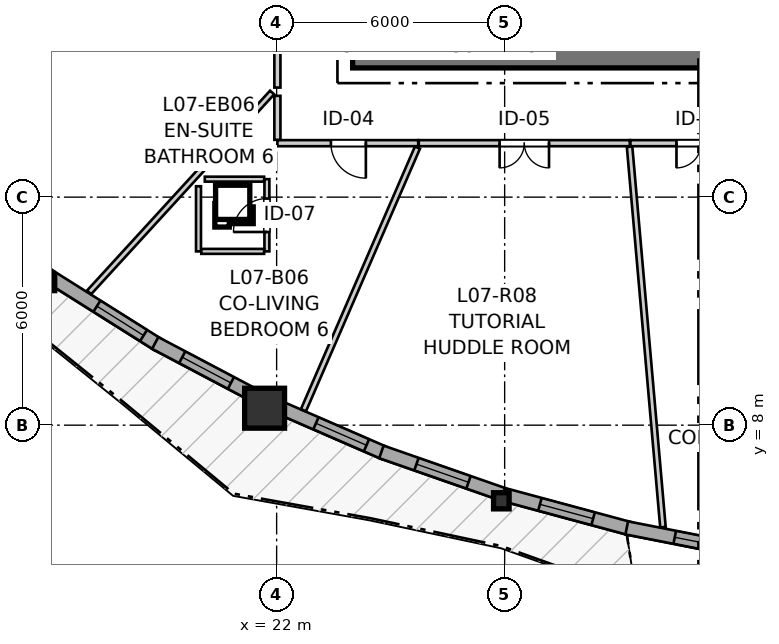
"""IFC4 building model, lengths in metres.
Left out: names, types, materials, properties, quantities, classifications, styles, units other than length and angle.
Written with IfcOpenShell. Run it as: python <this file> out.ifc"""

import sys

from ifc_helpers import new_model, si_unit, direction, frame, frame_2d, origin, origin_2d, place, context, subcontext, project, spatial, rectangle, i_section, extrude, source, transform, mapped, element, fill, save


model = new_model("IFC4")
c1 = context("Model", 3, precision=1e-05, world=origin(), true_north=direction((0.0, 1.0)))
c2 = subcontext(c1, "Body", "Model", "MODEL_VIEW")
j1 = project(units=[si_unit("LENGTHUNIT", "METRE"), si_unit("PLANEANGLEUNIT", "RADIAN")], contexts=[c1])
p1 = place(None, origin())
s1 = spatial("IfcSite", under=j1, at=p1, CompositionType="ELEMENT")
p2 = place(p1, origin())
s2 = spatial("IfcBuilding", under=s1, at=p2, CompositionType="ELEMENT")
p3 = place(p2, frame((0.0, 0.0, 27.0)))
s3 = spatial("IfcBuildingStorey", under=s2, at=p3, CompositionType="ELEMENT", Elevation=27.0)
p4 = place(p3, frame((24.0, 17.8, 0.0), z_axis=(0.0, 0.0, 1.0), x_axis=(1.0, 0.0, 0.0)))
e1 = element("IfcWall", 1, at=p4, inside=s3, PredefinedType="SHEAR", context=c2, shape_type="SweptSolid", body=[
    extrude(rectangle(XDim=12.7, YDim=0.8, at=frame_2d((6.35, 0.0))), origin(), (0.0, 0.0, 1.0), 2.935),
])
m1 = source(origin(), c2, "Body", "SweptSolid", [
    extrude(i_section(OverallWidth=0.409, OverallDepth=0.425, WebThickness=0.03, FlangeThickness=0.048, FilletRadius=0.015, at=origin_2d()), origin(), (0.0, 0.0, 1.0), 2.935),
])
p5 = place(p3, frame((15.956, 11.753, 0.0), z_axis=(0.0, 0.0, 1.0), x_axis=(1.0, 0.0, 0.0)))
e2 = element("IfcColumn", 2, at=p5, inside=s3, PredefinedType="PILASTER", context=c2, shape_type="MappedRepresentation", body=[
    mapped(m1, transform((0.0, 0.0, 0.0), x_axis=(1.0, 0.0, 0.0), y_axis=(0.0, 1.0, 0.0), z_axis=(0.0, 0.0, 1.0), scale=1.0)),
])
m2 = source(origin(), c2, "Body", "SweptSolid", [
    extrude(rectangle(XDim=1.05, YDim=1.05, at=origin_2d()), origin(), (0.0, 0.0, 1.0), 2.935),
])
p6 = place(p3, frame((21.683, 8.446, 0.0), z_axis=(0.0, 0.0, 1.0), x_axis=(1.0, 0.0, 0.0)))
e3 = element("IfcColumn", 3, at=p6, inside=s3, PredefinedType="COLUMN", context=c2, shape_type="MappedRepresentation", body=[
    mapped(m2, transform((0.0, 0.0, 0.0), x_axis=(1.0, 0.0, 0.0), y_axis=(0.0, 1.0, 0.0), z_axis=(0.0, 0.0, 1.0), scale=1.0)),
])
p7 = place(p3, frame((27.913, 6.01, 0.0), z_axis=(0.0, 0.0, 1.0), x_axis=(1.0, 0.0, 0.0)))
e4 = element("IfcColumn", 4, at=p7, inside=s3, PredefinedType="PILASTER", context=c2, shape_type="MappedRepresentation", body=[
    mapped(m1, transform((0.0, 0.0, 0.0), x_axis=(1.0, 0.0, 0.0), y_axis=(0.0, 1.0, 0.0), z_axis=(0.0, 0.0, 1.0), scale=1.0)),
])
p8 = place(p3, frame((13.355, 13.896, 0.0), z_axis=(0.0, 0.0, 1.0), x_axis=(0.803836316566, -0.594850549441, 0.0)))
e5 = element("IfcWall", 5, at=p8, inside=s3, PredefinedType="SOLIDWALL", context=c2, shape_type="SweptSolid", body=[
    extrude(rectangle(XDim=3.346, YDim=0.35, at=frame_2d((1.673, 0.0))), origin(), (0.0, 0.0, 1.0), 2.415),
])
p9 = place(p8, frame((1.108, 0.0, 0.82)))
e6 = element("IfcOpeningElement", 6, at=p9, cuts=e5, PredefinedType="OPENING", context=c2, shape_type="SweptSolid", body=[
    extrude(rectangle(XDim=1.15, YDim=1.2, at=frame_2d((0.575, 0.6))), frame((0.0, 0.185, 0.0), z_axis=(0.0, -1.0, 0.0), x_axis=(1.0, 0.0, 0.0)), (0.0, 0.0, 1.0), 0.37),
])
p10 = place(p3, frame((16.066, 11.89, 0.0), z_axis=(0.0, 0.0, 1.0), x_axis=(0.846403135518, -0.532542704565, 0.0)))
e7 = element("IfcWall", 7, at=p10, inside=s3, PredefinedType="SOLIDWALL", context=c2, shape_type="SweptSolid", body=[
    extrude(rectangle(XDim=3.327, YDim=0.35, at=frame_2d((1.664, 0.0))), origin(), (0.0, 0.0, 1.0), 2.415),
])
p11 = place(p10, frame((1.424, 0.0, 0.82)))
e8 = element("IfcOpeningElement", 8, at=p11, cuts=e7, PredefinedType="OPENING", context=c2, shape_type="SweptSolid", body=[
    extrude(rectangle(XDim=1.45, YDim=1.25, at=frame_2d((0.725, 0.625))), frame((0.0, 0.185, 0.0), z_axis=(0.0, -1.0, 0.0), x_axis=(1.0, 0.0, 0.0)), (0.0, 0.0, 1.0), 0.37),
])
p12 = place(p3, frame((18.805, 10.163, 0.0), z_axis=(0.0, 0.0, 1.0), x_axis=(0.884387509242, -0.466753396877, 0.0)))
e9 = element("IfcWall", 9, at=p12, inside=s3, PredefinedType="SOLIDWALL", context=c2, shape_type="SweptSolid", body=[
    extrude(rectangle(XDim=3.047, YDim=0.35, at=frame_2d((1.523, 0.0))), origin(), (0.0, 0.0, 1.0), 2.415),
])
p13 = place(p12, frame((0.803, 0.0, 0.82)))
e10 = element("IfcOpeningElement", 10, at=p13, cuts=e9, PredefinedType="OPENING", context=c2, shape_type="SweptSolid", body=[
    extrude(rectangle(XDim=1.45, YDim=1.25, at=frame_2d((0.725, 0.625))), frame((0.0, 0.185, 0.0), z_axis=(0.0, -1.0, 0.0), x_axis=(1.0, 0.0, 0.0)), (0.0, 0.0, 1.0), 0.37),
])
p14 = place(p3, frame((22.028, 8.487, 0.0), z_axis=(0.0, 0.0, 1.0), x_axis=(0.917081449464, -0.398699906006, 0.0)))
e11 = element("IfcWall", 11, at=p14, inside=s3, PredefinedType="SOLIDWALL", context=c2, shape_type="SweptSolid", body=[
    extrude(rectangle(XDim=3.066, YDim=0.35, at=frame_2d((1.533, 0.0))), origin(), (0.0, 0.0, 1.0), 2.415),
])
p15 = place(p14, frame((1.097, 0.0, 0.82)))
e12 = element("IfcOpeningElement", 12, at=p15, cuts=e11, PredefinedType="OPENING", context=c2, shape_type="SweptSolid", body=[
    extrude(rectangle(XDim=1.45, YDim=1.25, at=frame_2d((0.725, 0.625))), frame((0.0, 0.185, 0.0), z_axis=(0.0, -1.0, 0.0), x_axis=(1.0, 0.0, 0.0)), (0.0, 0.0, 1.0), 0.37),
])
p16 = place(p3, frame((24.757, 7.297, 0.0), z_axis=(0.0, 0.0, 1.0), x_axis=(0.944122401027, -0.329595042254, 0.0)))
e13 = element("IfcWall", 13, at=p16, inside=s3, PredefinedType="SOLIDWALL", context=c2, shape_type="SweptSolid", body=[
    extrude(rectangle(XDim=3.384, YDim=0.35, at=frame_2d((1.692, 0.0))), origin(), (0.0, 0.0, 1.0), 2.415),
])
p17 = place(p16, frame((0.977, 0.0, 0.82)))
e14 = element("IfcOpeningElement", 14, at=p17, cuts=e13, PredefinedType="OPENING", context=c2, shape_type="SweptSolid", body=[
    extrude(rectangle(XDim=1.45, YDim=1.25, at=frame_2d((0.725, 0.625))), frame((0.0, 0.185, 0.0), z_axis=(0.0, -1.0, 0.0), x_axis=(1.0, 0.0, 0.0)), (0.0, 0.0, 1.0), 0.37),
])
p18 = place(p3, frame((27.978, 6.174, 0.0), z_axis=(0.0, 0.0, 1.0), x_axis=(0.965451765427, -0.260581827136, 0.0)))
e15 = element("IfcWall", 15, at=p18, inside=s3, PredefinedType="SOLIDWALL", context=c2, shape_type="SweptSolid", body=[
    extrude(rectangle(XDim=3.439, YDim=0.35, at=frame_2d((1.72, 0.0))), origin(), (0.0, 0.0, 1.0), 2.415),
])
p19 = place(p18, frame((0.985, 0.0, 0.82)))
e16 = element("IfcOpeningElement", 16, at=p19, cuts=e15, PredefinedType="OPENING", context=c2, shape_type="SweptSolid", body=[
    extrude(rectangle(XDim=1.45, YDim=1.25, at=frame_2d((0.725, 0.625))), frame((0.0, 0.185, 0.0), z_axis=(0.0, -1.0, 0.0), x_axis=(1.0, 0.0, 0.0)), (0.0, 0.0, 1.0), 0.37),
])
p20 = place(p3, frame((31.213, 5.298, 0.0), z_axis=(0.0, 0.0, 1.0), x_axis=(0.9812345335, -0.192818023709, 0.0)))
e17 = element("IfcWall", 17, at=p20, inside=s3, PredefinedType="SOLIDWALL", context=c2, shape_type="SweptSolid", body=[
    extrude(rectangle(XDim=3.232, YDim=0.35, at=frame_2d((1.616, 0.0))), origin(), (0.0, 0.0, 1.0), 2.415),
])
p21 = place(p20, frame((1.287, 0.0, 0.82)))
e18 = element("IfcOpeningElement", 18, at=p21, cuts=e17, PredefinedType="OPENING", context=c2, shape_type="SweptSolid", body=[
    extrude(rectangle(XDim=1.45, YDim=1.25, at=frame_2d((0.725, 0.625))), frame((0.0, 0.185, 0.0), z_axis=(0.0, -1.0, 0.0), x_axis=(1.0, 0.0, 0.0)), (0.0, 0.0, 1.0), 0.37),
])
p22 = place(p3, frame((22.02, 16.883, 0.0), z_axis=(0.0, 0.0, 1.0), x_axis=(0.0, 1.0, 0.0)))
e19 = element("IfcWall", 19, at=p22, inside=s3, PredefinedType="PARTITIONING", context=c2, shape_type="SweptSolid", body=[
    extrude(rectangle(XDim=7.267, YDim=0.16, at=frame_2d((3.633, 0.0))), origin(), (0.0, 0.0, 1.0), 2.935),
])
p23 = place(p22, frame((2.845, 0.0, 0.0)))
e20 = element("IfcOpeningElement", 20, at=p23, cuts=e19, PredefinedType="OPENING", context=c2, shape_type="SweptSolid", body=[
    extrude(rectangle(XDim=1.3, YDim=2.1, at=frame_2d((0.65, 1.05))), frame((0.0, 0.09, 0.0), z_axis=(0.0, -1.0, 0.0), x_axis=(1.0, 0.0, 0.0)), (0.0, 0.0, 1.0), 0.18),
])
p24 = place(p3, frame((31.294, 15.42, 0.0), z_axis=(0.0, 0.0, 1.0), x_axis=(-1.0, 0.0, 0.0)))
e21 = element("IfcWall", 21, at=p24, inside=s3, PredefinedType="PARTITIONING", context=c2, shape_type="SweptSolid", body=[
    extrude(rectangle(XDim=5.554, YDim=0.16, at=frame_2d((2.777, 0.0))), origin(), (0.0, 0.0, 1.0), 2.935),
])
p25 = place(p24, frame((2.126, 0.0, 0.0)))
e22 = element("IfcOpeningElement", 22, at=p25, cuts=e21, PredefinedType="OPENING", context=c2, shape_type="SweptSolid", body=[
    extrude(rectangle(XDim=1.3, YDim=2.1, at=frame_2d((0.65, 1.05))), frame((0.0, 0.09, 0.0), z_axis=(0.0, -1.0, 0.0), x_axis=(1.0, 0.0, 0.0)), (0.0, 0.0, 1.0), 0.18),
])
p26 = place(p3, frame((35.08, 15.42, 0.0), z_axis=(0.0, 0.0, 1.0), x_axis=(-1.0, 0.0, 0.0)))
e23 = element("IfcWall", 23, at=p26, inside=s3, PredefinedType="PARTITIONING", context=c2, shape_type="SweptSolid", body=[
    extrude(rectangle(XDim=3.771, YDim=0.16, at=frame_2d((1.885, 0.0))), origin(), (0.0, 0.0, 1.0), 2.935),
])
p27 = place(p26, frame((1.259, 0.0, 0.0)))
e24 = element("IfcOpeningElement", 24, at=p27, cuts=e23, PredefinedType="OPENING", context=c2, shape_type="SweptSolid", body=[
    extrude(rectangle(XDim=1.3, YDim=2.1, at=frame_2d((0.65, 1.05))), frame((0.0, 0.09, 0.0), z_axis=(0.0, -1.0, 0.0), x_axis=(1.0, 0.0, 0.0)), (0.0, 0.0, 1.0), 0.18),
])
p28 = place(p3, frame((25.725, 15.42, 0.0), z_axis=(0.0, 0.0, 1.0), x_axis=(-1.0, 0.0, 0.0)))
e25 = element("IfcWall", 25, at=p28, inside=s3, PredefinedType="PARTITIONING", context=c2, shape_type="SweptSolid", body=[
    extrude(rectangle(XDim=3.705, YDim=0.16, at=frame_2d((1.853, 0.0))), origin(), (0.0, 0.0, 1.0), 2.935),
])
p29 = place(p28, frame((1.377, 0.0, 0.0)))
e26 = element("IfcOpeningElement", 26, at=p29, cuts=e25, PredefinedType="OPENING", context=c2, shape_type="SweptSolid", body=[
    extrude(rectangle(XDim=0.92, YDim=2.1, at=frame_2d((0.46, 1.05))), frame((0.0, 0.09, 0.0), z_axis=(0.0, -1.0, 0.0), x_axis=(1.0, 0.0, 0.0)), (0.0, 0.0, 1.0), 0.18),
])
p30 = place(p3, frame((21.744, 12.573, 0.0), z_axis=(0.0, 0.0, 1.0), x_axis=(0.0, 1.0, 0.0)))
e27 = element("IfcWall", 27, at=p30, inside=s3, PredefinedType="PARTITIONING", context=c2, shape_type="SweptSolid", body=[
    extrude(rectangle(XDim=1.9, YDim=0.13, at=frame_2d((0.95, 0.0))), origin(), (0.0, 0.0, 1.0), 2.935),
])
p31 = place(p30, frame((0.51, 0.0, 0.0)))
e28 = element("IfcOpeningElement", 28, at=p31, cuts=e27, PredefinedType="OPENING", context=c2, shape_type="SweptSolid", body=[
    extrude(rectangle(XDim=0.88, YDim=2.05, at=frame_2d((0.44, 1.025))), frame((0.0, 0.075, 0.0), z_axis=(0.0, -1.0, 0.0), x_axis=(1.0, 0.0, 0.0)), (0.0, 0.0, 1.0), 0.15),
])
p32 = place(p3, frame((31.287, 15.326, 0.0), z_axis=(0.0, 0.0, 1.0), x_axis=(0.087404477037, -0.99617290537, 0.0)))
e29 = element("IfcWall", 29, at=p32, inside=s3, PredefinedType="PARTITIONING", context=c2, shape_type="SweptSolid", body=[
    extrude(rectangle(XDim=10.047, YDim=0.145, at=frame_2d((5.023, 0.0))), origin(), (0.0, 0.0, 1.0), 2.935),
])
p33 = place(p3, frame((22.705, 8.392, 0.0), z_axis=(0.0, 0.0, 1.0), x_axis=(0.398228422372, 0.917286282256, 0.0)))
e30 = element("IfcWall", 30, at=p33, inside=s3, PredefinedType="PARTITIONING", context=c2, shape_type="SweptSolid", body=[
    extrude(rectangle(XDim=7.535, YDim=0.145, at=frame_2d((3.767, 0.0))), origin(), (0.0, 0.0, 1.0), 2.935),
])
p34 = place(p3, frame((17.064, 11.493, 0.0), z_axis=(0.0, 0.0, 1.0), x_axis=(0.67534166785, 0.737505004502, 0.0)))
e31 = element("IfcWall", 31, at=p34, inside=s3, PredefinedType="PARTITIONING", context=c2, shape_type="SweptSolid", body=[
    extrude(rectangle(XDim=7.132, YDim=0.145, at=frame_2d((3.566, 0.0))), origin(), (0.0, 0.0, 1.0), 2.935),
])
p35 = place(p3, frame((19.944, 12.573, 0.0), z_axis=(0.0, 0.0, 1.0), x_axis=(0.0, 1.0, 0.0)))
e32 = element("IfcWall", 32, at=p35, inside=s3, PredefinedType="PARTITIONING", context=c2, shape_type="SweptSolid", body=[
    extrude(rectangle(XDim=1.714, YDim=0.13, at=frame_2d((0.857, 0.0))), origin(), (0.0, 0.0, 1.0), 2.935),
])
p36 = place(p3, frame((20.11, 14.473, 0.0), z_axis=(0.0, 0.0, 1.0), x_axis=(1.0, 0.0, 0.0)))
e33 = element("IfcWall", 33, at=p36, inside=s3, PredefinedType="PARTITIONING", context=c2, shape_type="SweptSolid", body=[
    extrude(rectangle(XDim=1.561, YDim=0.13, at=frame_2d((0.781, 0.0))), origin(), (0.0, 0.0, 1.0), 2.935),
])
p37 = place(p3, frame((20.017, 12.573, 0.0), z_axis=(0.0, 0.0, 1.0), x_axis=(1.0, 0.0, 0.0)))
e34 = element("IfcWall", 34, at=p37, inside=s3, PredefinedType="PARTITIONING", context=c2, shape_type="SweptSolid", body=[
    extrude(rectangle(XDim=1.654, YDim=0.13, at=frame_2d((0.827, 0.0))), origin(), (0.0, 0.0, 1.0), 2.935),
])
p38 = place(p3, frame((22.02, 15.508, 0.0), z_axis=(0.0, 0.0, 1.0), x_axis=(0.0, 1.0, 0.0)))
e35 = element("IfcWall", 35, at=p38, inside=s3, PredefinedType="PARTITIONING", context=c2, shape_type="SweptSolid", body=[
    extrude(rectangle(XDim=1.157, YDim=0.16, at=frame_2d((0.579, 0.0))), origin(), (0.0, 0.0, 1.0), 2.935),
])
m3 = source(origin(), c2, "Body", "SweptSolid", [
    extrude(rectangle(XDim=1.45, YDim=1.25, at=frame_2d((0.725, 0.625))), frame((0.0, 0.03, 0.0), z_axis=(0.0, -1.0, 0.0), x_axis=(1.0, 0.0, 0.0)), (0.0, 0.0, 1.0), 0.06),
])
p39 = place(p11, origin())
e36 = element("IfcWindow", 36, at=p39, inside=s3, PartitioningType="SINGLE_PANEL", PredefinedType="WINDOW", context=c2, shape_type="MappedRepresentation", body=[
    mapped(m3, transform((0.0, 0.0, 0.0), x_axis=(1.0, 0.0, 0.0), y_axis=(0.0, 1.0, 0.0), z_axis=(0.0, 0.0, 1.0), scale=1.0)),
])
fill(e8, e36)
p40 = place(p13, origin())
e37 = element("IfcWindow", 37, at=p40, inside=s3, PartitioningType="SINGLE_PANEL", PredefinedType="WINDOW", context=c2, shape_type="MappedRepresentation", body=[
    mapped(m3, transform((0.0, 0.0, 0.0), x_axis=(1.0, 0.0, 0.0), y_axis=(0.0, 1.0, 0.0), z_axis=(0.0, 0.0, 1.0), scale=1.0)),
])
fill(e10, e37)
p41 = place(p15, origin())
e38 = element("IfcWindow", 38, at=p41, inside=s3, PartitioningType="SINGLE_PANEL", PredefinedType="WINDOW", context=c2, shape_type="MappedRepresentation", body=[
    mapped(m3, transform((0.0, 0.0, 0.0), x_axis=(1.0, 0.0, 0.0), y_axis=(0.0, 1.0, 0.0), z_axis=(0.0, 0.0, 1.0), scale=1.0)),
])
fill(e12, e38)
p42 = place(p17, origin())
e39 = element("IfcWindow", 39, at=p42, inside=s3, PartitioningType="SINGLE_PANEL", PredefinedType="WINDOW", context=c2, shape_type="MappedRepresentation", body=[
    mapped(m3, transform((0.0, 0.0, 0.0), x_axis=(1.0, 0.0, 0.0), y_axis=(0.0, 1.0, 0.0), z_axis=(0.0, 0.0, 1.0), scale=1.0)),
])
fill(e14, e39)
p43 = place(p19, origin())
e40 = element("IfcWindow", 40, at=p43, inside=s3, PartitioningType="SINGLE_PANEL", PredefinedType="WINDOW", context=c2, shape_type="MappedRepresentation", body=[
    mapped(m3, transform((0.0, 0.0, 0.0), x_axis=(1.0, 0.0, 0.0), y_axis=(0.0, 1.0, 0.0), z_axis=(0.0, 0.0, 1.0), scale=1.0)),
])
fill(e16, e40)
p44 = place(p21, origin())
e41 = element("IfcWindow", 41, at=p44, inside=s3, PartitioningType="SINGLE_PANEL", PredefinedType="WINDOW", context=c2, shape_type="MappedRepresentation", body=[
    mapped(m3, transform((0.0, 0.0, 0.0), x_axis=(1.0, 0.0, 0.0), y_axis=(0.0, 1.0, 0.0), z_axis=(0.0, 0.0, 1.0), scale=1.0)),
])
fill(e18, e41)
m4 = source(origin(), c2, "Body", "SweptSolid", [
    extrude(rectangle(XDim=1.3, YDim=2.1, at=frame_2d((0.65, 1.05))), frame((0.0, 0.025, 0.0), z_axis=(0.0, -1.0, 0.0), x_axis=(1.0, 0.0, 0.0)), (0.0, 0.0, 1.0), 0.05),
])
p45 = place(p25, origin())
e42 = element("IfcDoor", 42, at=p45, inside=s3, OperationType="DOUBLE_DOOR_SINGLE_SWING", PredefinedType="DOOR", context=c2, shape_type="MappedRepresentation", body=[
    mapped(m4, transform((0.0, 0.0, 0.0), x_axis=(1.0, 0.0, 0.0), y_axis=(0.0, 1.0, 0.0), z_axis=(0.0, 0.0, 1.0), scale=1.0)),
])
fill(e22, e42)
p46 = place(p27, origin())
e43 = element("IfcDoor", 43, at=p46, inside=s3, OperationType="DOUBLE_DOOR_SINGLE_SWING", PredefinedType="DOOR", context=c2, shape_type="MappedRepresentation", body=[
    mapped(m4, transform((0.0, 0.0, 0.0), x_axis=(1.0, 0.0, 0.0), y_axis=(0.0, 1.0, 0.0), z_axis=(0.0, 0.0, 1.0), scale=1.0)),
])
fill(e24, e43)
m5 = source(origin(), c2, "Body", "SweptSolid", [
    extrude(rectangle(XDim=0.92, YDim=2.1, at=frame_2d((0.46, 1.05))), frame((0.0, 0.025, 0.0), z_axis=(0.0, -1.0, 0.0), x_axis=(1.0, 0.0, 0.0)), (0.0, 0.0, 1.0), 0.05),
])
p47 = place(p29, origin())
e44 = element("IfcDoor", 44, at=p47, inside=s3, OperationType="SINGLE_SWING_LEFT", PredefinedType="DOOR", context=c2, shape_type="MappedRepresentation", body=[
    mapped(m5, transform((0.0, 0.0, 0.0), x_axis=(1.0, 0.0, 0.0), y_axis=(0.0, 1.0, 0.0), z_axis=(0.0, 0.0, 1.0), scale=1.0)),
])
fill(e26, e44)
m6 = source(origin(), c2, "Body", "SweptSolid", [
    extrude(rectangle(XDim=0.88, YDim=2.05, at=frame_2d((0.44, 1.025))), frame((0.0, 0.025, 0.0), z_axis=(0.0, -1.0, 0.0), x_axis=(1.0, 0.0, 0.0)), (0.0, 0.0, 1.0), 0.05),
])
p48 = place(p31, origin())
e45 = element("IfcDoor", 45, at=p48, inside=s3, OperationType="SINGLE_SWING_LEFT", PredefinedType="DOOR", context=c2, shape_type="MappedRepresentation", body=[
    mapped(m6, transform((0.0, 0.0, 0.0), x_axis=(1.0, 0.0, 0.0), y_axis=(0.0, 1.0, 0.0), z_axis=(0.0, 0.0, 1.0), scale=1.0)),
])
fill(e28, e45)
save(model, sys.argv[1])
